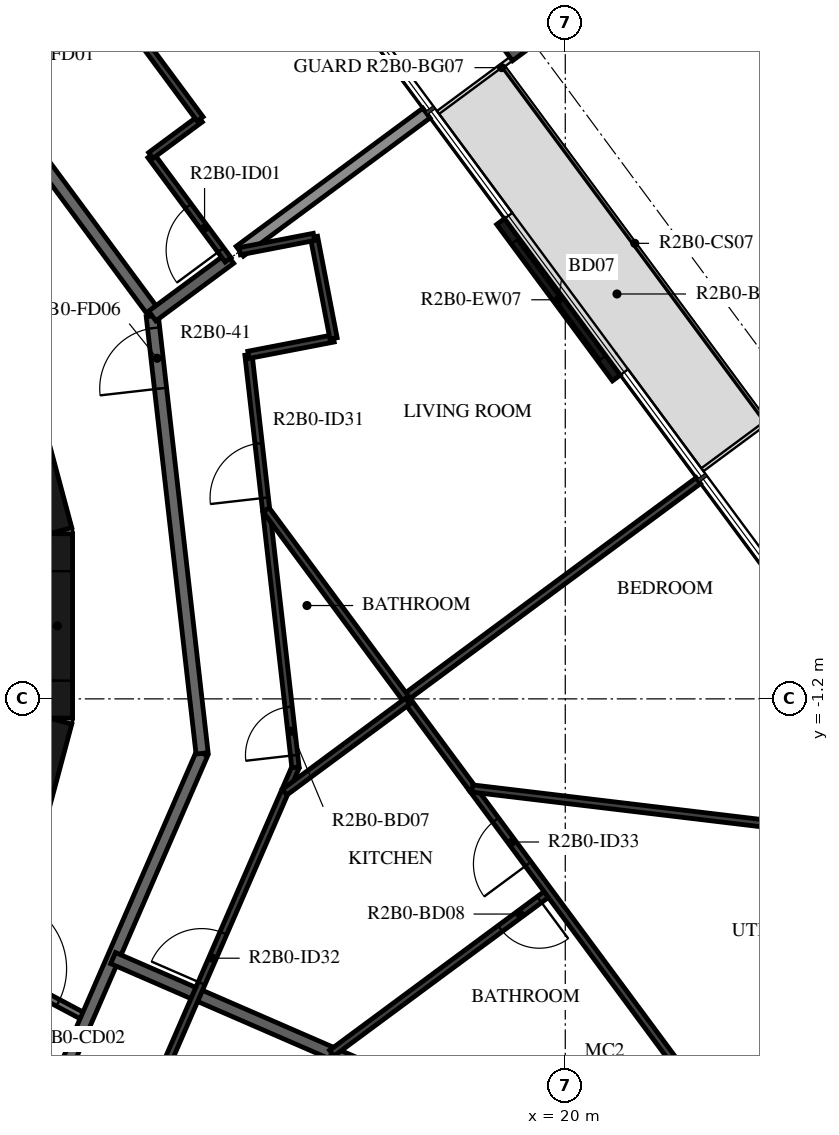
"""IFC4 building model, lengths in metres.
Left out: names, types, materials, properties, quantities, classifications, styles, units other than length and angle.
Written with IfcOpenShell. Run it as: python <this file> out.ifc"""

import sys

from ifc_helpers import new_model, si_unit, direction, frame, frame_2d, origin, origin_2d, place, context, subcontext, project, spatial, rectangle, i_section, extrude, element, fill, save


model = new_model("IFC4")
c1 = context("Model", 3, precision=1e-05, world=origin(), true_north=direction((0.0, 1.0)))
c2 = subcontext(c1, "Body", "Model", "MODEL_VIEW")
j1 = project(units=[si_unit("LENGTHUNIT", "METRE"), si_unit("PLANEANGLEUNIT", "RADIAN")], contexts=[c1])
p1 = place(None, origin())
s1 = spatial("IfcSite", under=j1, at=p1, CompositionType="ELEMENT")
p2 = place(p1, origin())
s2 = spatial("IfcBuilding", under=s1, at=p2, CompositionType="ELEMENT")
p3 = place(p2, frame((0.0, 0.0, 90.7)))
s3 = spatial("IfcBuildingStorey", under=s2, at=p3, CompositionType="ELEMENT", Elevation=90.7)
p4 = place(p3, frame((19.405, 9.682, -0.38), z_axis=(0.0, 0.0, 1.0), x_axis=(0.594822857897, -0.803856807972, 0.0)))
e1 = element("IfcColumn", 1, at=p4, inside=s3, PredefinedType="COLUMN", context=c2, shape_type="SweptSolid", body=[
    extrude(i_section(OverallWidth=0.3, OverallDepth=0.9, WebThickness=0.019, FlangeThickness=0.035, FilletRadius=0.03, at=origin_2d()), origin(), (0.0, 0.0, 1.0), 3.5),
])
p5 = place(p3, frame((20.84, 4.077, 0.0), z_axis=(0.0, 0.0, 1.0), x_axis=(-0.594824273168, 0.803855760725, 0.0)))
e2 = element("IfcWall", 2, at=p5, inside=s3, PredefinedType="STANDARD", context=c2, shape_type="SweptSolid", body=[
    extrude(rectangle(XDim=3.2, YDim=0.16, at=frame_2d((1.6, 0.0))), origin(), (0.0, 0.0, 1.0), 3.12),
])
p6 = place(p5, frame((0.4, 0.0, 0.0)))
e3 = element("IfcOpeningElement", 3, at=p6, cuts=e2, PredefinedType="OPENING", context=c2, shape_type="SweptSolid", body=[
    extrude(rectangle(XDim=2.4, YDim=2.4, at=frame_2d((1.2, 1.2))), frame((0.0, 0.09, 0.0), z_axis=(0.0, -1.0, 0.0), x_axis=(1.0, 0.0, 0.0)), (0.0, 0.0, 1.0), 0.18),
])
p7 = place(p3, frame((10.858, -4.479, 0.0), z_axis=(0.0, 0.0, 1.0), x_axis=(0.258734743916, 0.965948410781, 0.0)))
e4 = element("IfcWall", 4, at=p7, inside=s3, PredefinedType="SHEAR", context=c2, shape_type="SweptSolid", body=[
    extrude(rectangle(XDim=3.033, YDim=0.5, at=frame_2d((1.516, 0.0))), origin(), (0.0, 0.0, 1.0), 3.12),
])
p8 = place(p3, frame((11.647, -1.516, 0.0), z_axis=(0.0, 0.0, 1.0), x_axis=(0.0, 1.0, 0.0)))
e5 = element("IfcWall", 5, at=p8, inside=s3, PredefinedType="SHEAR", context=c2, shape_type="SweptSolid", body=[
    extrude(rectangle(XDim=3.033, YDim=0.5, at=frame_2d((1.516, 0.0))), origin(), (0.0, 0.0, 1.0), 3.12),
])
p9 = place(p8, frame((0.616, 0.0, 0.0)))
e6 = element("IfcOpeningElement", 6, at=p9, cuts=e5, PredefinedType="OPENING", context=c2, shape_type="SweptSolid", body=[
    extrude(rectangle(XDim=1.8, YDim=2.1, at=frame_2d((0.9, 1.05))), frame((0.0, 0.26, 0.0), z_axis=(0.0, -1.0, 0.0), x_axis=(1.0, 0.0, 0.0)), (0.0, 0.0, 1.0), 0.52),
])
p10 = place(p3, frame((11.643, 1.55, 0.0), z_axis=(0.0, 0.0, 1.0), x_axis=(-0.258734743916, 0.965948410781, 0.0)))
e7 = element("IfcWall", 7, at=p10, inside=s3, PredefinedType="SHEAR", context=c2, shape_type="SweptSolid", body=[
    extrude(rectangle(XDim=3.033, YDim=0.5, at=frame_2d((1.516, 0.0))), origin(), (0.0, 0.0, 1.0), 3.12),
])
p11 = place(p3, frame((10.511, -5.589, 0.0), z_axis=(0.0, 0.0, 1.0), x_axis=(0.882962602189, -0.469443333253, 0.0)))
e8 = element("IfcWall", 8, at=p11, inside=s3, PredefinedType="PARTITIONING", context=c2, shape_type="SweptSolid", body=[
    extrude(rectangle(XDim=1.838, YDim=0.12, at=frame_2d((0.919, 0.0))), origin(), (0.0, 0.0, 1.0), 3.12),
])
p12 = place(p11, frame((0.1, 0.0, 0.0)))
e9 = element("IfcOpeningElement", 9, at=p12, cuts=e8, PredefinedType="OPENING", context=c2, shape_type="SweptSolid", body=[
    extrude(rectangle(XDim=1.2, YDim=2.1, at=frame_2d((0.6, 1.05))), frame((0.0, 0.07, 0.0), z_axis=(0.0, -1.0, 0.0), x_axis=(1.0, 0.0, 0.0)), (0.0, 0.0, 1.0), 0.14),
])
p13 = place(p3, frame((13.196, 5.198, 0.0), z_axis=(0.0, 0.0, 1.0), x_axis=(-0.594805187394, 0.803869883159, 0.0)))
e10 = element("IfcWall", 10, at=p13, inside=s3, PredefinedType="STANDARD", context=c2, shape_type="SweptSolid", body=[
    extrude(rectangle(XDim=7.342, YDim=0.2, at=frame_2d((3.671, 0.0))), origin(), (0.0, 0.0, 1.0), 3.12),
])
p14 = place(p13, frame((4.7, 0.0, 0.0)))
e11 = element("IfcOpeningElement", 11, at=p14, cuts=e10, PredefinedType="OPENING", context=c2, shape_type="SweptSolid", body=[
    extrude(rectangle(XDim=1.0, YDim=2.1, at=frame_2d((0.5, 1.05))), frame((0.0, 0.11, 0.0), z_axis=(0.0, -1.0, 0.0), x_axis=(1.0, 0.0, 0.0)), (0.0, 0.0, 1.0), 0.22),
])
p15 = place(p3, frame((11.1, -8.829, 0.0), z_axis=(0.0, 0.0, 1.0), x_axis=(0.398741918631, 0.917063183388, 0.0)))
e12 = element("IfcWall", 12, at=p15, inside=s3, PredefinedType="STANDARD", context=c2, shape_type="SweptSolid", body=[
    extrude(rectangle(XDim=7.342, YDim=0.2, at=frame_2d((3.671, 0.0))), origin(), (0.0, 0.0, 1.0), 3.12),
])
p16 = place(p3, frame((14.028, -2.096, 0.0), z_axis=(0.0, 0.0, 1.0), x_axis=(-0.113207047924, 0.993571418822, 0.0)))
e13 = element("IfcWall", 13, at=p16, inside=s3, PredefinedType="STANDARD", context=c2, shape_type="SweptSolid", body=[
    extrude(rectangle(XDim=7.24, YDim=0.2, at=frame_2d((3.62, 0.0))), origin(), (0.0, 0.0, 1.0), 3.12),
])
p17 = place(p16, frame((6.04, 0.0, 0.0)))
e14 = element("IfcOpeningElement", 14, at=p17, cuts=e13, PredefinedType="OPENING", context=c2, shape_type="SweptSolid", body=[
    extrude(rectangle(XDim=1.0, YDim=2.1, at=frame_2d((0.5, 1.05))), frame((0.0, 0.11, 0.0), z_axis=(0.0, -1.0, 0.0), x_axis=(1.0, 0.0, 0.0)), (0.0, 0.0, 1.0), 0.22),
])
p18 = place(p3, frame((13.208, 5.097, 0.0), z_axis=(0.0, 0.0, 1.0), x_axis=(0.803831627965, 0.594856885211, 0.0)))
e15 = element("IfcWall", 15, at=p18, inside=s3, PredefinedType="STANDARD", context=c2, shape_type="SweptSolid", body=[
    extrude(rectangle(XDim=1.591, YDim=0.2, at=frame_2d((0.796, 0.0))), origin(), (0.0, 0.0, 1.0), 3.12),
])
p19 = place(p3, frame((14.647, 6.161, 0.0), z_axis=(0.0, 0.0, 1.0), x_axis=(0.803842510616, 0.594842179175, 0.0)))
e16 = element("IfcWall", 16, at=p19, inside=s3, PredefinedType="STANDARD", context=c2, shape_type="SweptSolid", body=[
    extrude(rectangle(XDim=3.819, YDim=0.2, at=frame_2d((1.909, 0.0))), origin(), (0.0, 0.0, 1.0), 2.73),
])
p20 = place(p3, frame((16.16, -7.027, 0.0), z_axis=(0.0, 0.0, 1.0), x_axis=(-0.917065107526, 0.398737493293, 0.0)))
e17 = element("IfcWall", 17, at=p20, inside=s3, PredefinedType="STANDARD", context=c2, shape_type="SweptSolid", body=[
    extrude(rectangle(XDim=3.922, YDim=0.2, at=frame_2d((1.961, 0.0))), origin(), (0.0, 0.0, 1.0), 3.12),
])
p21 = place(p3, frame((19.198, -8.347, 0.0), z_axis=(0.0, 0.0, 1.0), x_axis=(-0.917046616943, 0.398780017495, 0.0)))
e18 = element("IfcWall", 18, at=p21, inside=s3, PredefinedType="STANDARD", context=c2, shape_type="SweptSolid", body=[
    extrude(rectangle(XDim=3.312, YDim=0.2, at=frame_2d((1.656, 0.0))), origin(), (0.0, 0.0, 1.0), 3.12),
])
p22 = place(p3, frame((14.455, 6.019, 0.0), z_axis=(0.0, 0.0, 1.0), x_axis=(-0.594792774379, 0.803879067737, 0.0)))
e19 = element("IfcWall", 19, at=p22, inside=s3, PredefinedType="PARTITIONING", context=c2, shape_type="SweptSolid", body=[
    extrude(rectangle(XDim=2.136, YDim=0.12, at=frame_2d((1.068, 0.0))), origin(), (0.0, 0.0, 1.0), 3.12),
])
p23 = place(p22, frame((0.2, 0.0, 0.0)))
e20 = element("IfcOpeningElement", 20, at=p23, cuts=e19, PredefinedType="OPENING", context=c2, shape_type="SweptSolid", body=[
    extrude(rectangle(XDim=0.9, YDim=2.1, at=frame_2d((0.45, 1.05))), frame((0.0, 0.07, 0.0), z_axis=(0.0, -1.0, 0.0), x_axis=(1.0, 0.0, 0.0)), (0.0, 0.0, 1.0), 0.14),
])
p24 = place(p3, frame((13.185, 7.736, 0.0), z_axis=(0.0, 0.0, 1.0), x_axis=(0.803934518159, 0.594717824277, 0.0)))
e21 = element("IfcWall", 21, at=p24, inside=s3, PredefinedType="PARTITIONING", context=c2, shape_type="SweptSolid", body=[
    extrude(rectangle(XDim=1.008, YDim=0.12, at=frame_2d((0.504, 0.0))), origin(), (0.0, 0.0, 1.0), 3.12),
])
p25 = place(p3, frame((13.995, 8.336, 0.0), z_axis=(0.0, 0.0, 1.0), x_axis=(-0.59480284986, 0.803871612758, 0.0)))
e22 = element("IfcWall", 22, at=p25, inside=s3, PredefinedType="PARTITIONING", context=c2, shape_type="SweptSolid", body=[
    extrude(rectangle(XDim=4.4, YDim=0.12, at=frame_2d((2.2, 0.0))), origin(), (0.0, 0.0, 1.0), 3.12),
])
p26 = place(p3, frame((12.703, -8.904, 0.0), z_axis=(0.0, 0.0, 1.0), x_axis=(0.398716154453, 0.917074385303, 0.0)))
e23 = element("IfcWall", 23, at=p26, inside=s3, PredefinedType="PARTITIONING", context=c2, shape_type="SweptSolid", body=[
    extrude(rectangle(XDim=7.173, YDim=0.12, at=frame_2d((3.586, 0.0))), origin(), (0.0, 0.0, 1.0), 3.12),
])
p27 = place(p26, frame((3.3, 0.0, 0.0)))
e24 = element("IfcOpeningElement", 24, at=p27, cuts=e23, PredefinedType="OPENING", context=c2, shape_type="SweptSolid", body=[
    extrude(rectangle(XDim=0.9, YDim=2.1, at=frame_2d((0.45, 1.05))), frame((0.0, 0.07, 0.0), z_axis=(0.0, -1.0, 0.0), x_axis=(1.0, 0.0, 0.0)), (0.0, 0.0, 1.0), 0.14),
])
p28 = place(p3, frame((15.563, -2.326, 0.0), z_axis=(0.0, 0.0, 1.0), x_axis=(-0.113209750844, 0.993571110849, 0.0)))
e25 = element("IfcWall", 25, at=p28, inside=s3, PredefinedType="PARTITIONING", context=c2, shape_type="SweptSolid", body=[
    extrude(rectangle(XDim=6.828, YDim=0.12, at=frame_2d((3.414, 0.0))), origin(), (0.0, 0.0, 1.0), 3.12),
])
p29 = place(p28, frame((4.461, 0.0, 0.0)))
e26 = element("IfcOpeningElement", 26, at=p29, cuts=e25, PredefinedType="OPENING", context=c2, shape_type="SweptSolid", body=[
    extrude(rectangle(XDim=0.9, YDim=2.1, at=frame_2d((0.45, 1.05))), frame((0.0, 0.07, 0.0), z_axis=(0.0, -1.0, 0.0), x_axis=(1.0, 0.0, 0.0)), (0.0, 0.0, 1.0), 0.14),
])
p30 = place(p28, frame((0.2, 0.0, 0.0)))
e27 = element("IfcOpeningElement", 27, at=p30, cuts=e25, PredefinedType="OPENING", context=c2, shape_type="SweptSolid", body=[
    extrude(rectangle(XDim=0.8, YDim=2.1, at=frame_2d((0.4, 1.05))), frame((0.0, 0.07, 0.0), z_axis=(0.0, -1.0, 0.0), x_axis=(1.0, 0.0, 0.0)), (0.0, 0.0, 1.0), 0.14),
])
p31 = place(p3, frame((14.79, 4.458, 0.0), z_axis=(0.0, 0.0, 1.0), x_axis=(0.981914676232, 0.189323977881, 0.0)))
e28 = element("IfcWall", 28, at=p31, inside=s3, PredefinedType="PARTITIONING", context=c2, shape_type="SweptSolid", body=[
    extrude(rectangle(XDim=1.425, YDim=0.12, at=frame_2d((0.712, 0.0))), origin(), (0.0, 0.0, 1.0), 3.12),
])
p32 = place(p3, frame((16.189, 4.728, 0.0), z_axis=(0.0, 0.0, 1.0), x_axis=(-0.18942796612, 0.981894620441, 0.0)))
e29 = element("IfcWall", 29, at=p32, inside=s3, PredefinedType="PARTITIONING", context=c2, shape_type="SweptSolid", body=[
    extrude(rectangle(XDim=1.7, YDim=0.12, at=frame_2d((0.85, 0.0))), origin(), (0.0, 0.0, 1.0), 3.12),
])
p33 = place(p3, frame((15.867, 6.397, 0.0), z_axis=(0.0, 0.0, 1.0), x_axis=(-0.981909648822, -0.189350050303, 0.0)))
e30 = element("IfcWall", 30, at=p33, inside=s3, PredefinedType="PARTITIONING", context=c2, shape_type="SweptSolid", body=[
    extrude(rectangle(XDim=1.243, YDim=0.12, at=frame_2d((0.622, 0.0))), origin(), (0.0, 0.0, 1.0), 3.12),
])
p34 = place(p3, frame((17.366, -1.18, 0.0), z_axis=(0.0, 0.0, 1.0), x_axis=(0.803855518832, 0.594824600065, 0.0)))
e31 = element("IfcWall", 31, at=p34, inside=s3, PredefinedType="PARTITIONING", context=c2, shape_type="SweptSolid", body=[
    extrude(rectangle(XDim=6.0, YDim=0.12, at=frame_2d((3.0, 0.0))), origin(), (0.0, 0.0, 1.0), 2.73),
])
p35 = place(p3, frame((15.081, 1.907, 0.0), z_axis=(0.0, 0.0, 1.0), x_axis=(0.594819754849, -0.803859104098, 0.0)))
e32 = element("IfcWall", 32, at=p35, inside=s3, PredefinedType="PARTITIONING", context=c2, shape_type="SweptSolid", body=[
    extrude(rectangle(XDim=5.699, YDim=0.12, at=frame_2d((2.85, 0.0))), origin(), (0.0, 0.0, 1.0), 3.12),
])
p36 = place(p3, frame((28.162, -6.368, 0.0), z_axis=(0.0, 0.0, 1.0), x_axis=(-0.944645847702, -0.328091789624, 0.0)))
e33 = element("IfcWall", 33, at=p36, inside=s3, PredefinedType="PARTITIONING", context=c2, shape_type="SweptSolid", body=[
    extrude(rectangle(XDim=6.007, YDim=0.12, at=frame_2d((3.003, 0.0))), origin(), (0.0, 0.0, 1.0), 3.12),
])
p37 = place(p36, frame((0.2, 0.0, 0.0)))
e34 = element("IfcOpeningElement", 34, at=p37, cuts=e33, PredefinedType="OPENING", context=c2, shape_type="SweptSolid", body=[
    extrude(rectangle(XDim=0.9, YDim=2.1, at=frame_2d((0.45, 1.05))), frame((0.0, 0.07, 0.0), z_axis=(0.0, -1.0, 0.0), x_axis=(1.0, 0.0, 0.0)), (0.0, 0.0, 1.0), 0.14),
])
p38 = place(p3, frame((19.735, -4.382, 0.0), z_axis=(0.0, 0.0, 1.0), x_axis=(-0.803850825108, -0.594830943188, 0.0)))
e35 = element("IfcWall", 35, at=p38, inside=s3, PredefinedType="PARTITIONING", context=c2, shape_type="SweptSolid", body=[
    extrude(rectangle(XDim=4.447, YDim=0.12, at=frame_2d((2.223, 0.0))), origin(), (0.0, 0.0, 1.0), 3.12),
])
p39 = place(p38, frame((0.2, 0.0, 0.0)))
e36 = element("IfcOpeningElement", 36, at=p39, cuts=e35, PredefinedType="OPENING", context=c2, shape_type="SweptSolid", body=[
    extrude(rectangle(XDim=0.8, YDim=2.1, at=frame_2d((0.4, 1.05))), frame((0.0, 0.07, 0.0), z_axis=(0.0, -1.0, 0.0), x_axis=(1.0, 0.0, 0.0)), (0.0, 0.0, 1.0), 0.14),
])
p40 = place(p3, frame((22.048, -7.507, 0.0), z_axis=(0.0, 0.0, 1.0), x_axis=(-0.59484195588, 0.803842675855, 0.0)))
e37 = element("IfcWall", 37, at=p40, inside=s3, PredefinedType="PARTITIONING", context=c2, shape_type="SweptSolid", body=[
    extrude(rectangle(XDim=6.012, YDim=0.12, at=frame_2d((3.006, 0.0))), origin(), (0.0, 0.0, 1.0), 3.12),
])
p41 = place(p40, frame((4.469, 0.0, 0.0)))
e38 = element("IfcOpeningElement", 38, at=p41, cuts=e37, PredefinedType="OPENING", context=c2, shape_type="SweptSolid", body=[
    extrude(rectangle(XDim=0.9, YDim=2.1, at=frame_2d((0.45, 1.05))), frame((0.0, 0.07, 0.0), z_axis=(0.0, -1.0, 0.0), x_axis=(1.0, 0.0, 0.0)), (0.0, 0.0, 1.0), 0.14),
])
p42 = place(p3, frame((17.408, -1.237, 0.0), z_axis=(0.0, 0.0, 1.0), x_axis=(-0.803863255433, -0.594814144556, 0.0)))
e39 = element("IfcWall", 39, at=p42, inside=s3, PredefinedType="PARTITIONING", context=c2, shape_type="SweptSolid", body=[
    extrude(rectangle(XDim=2.514, YDim=0.12, at=frame_2d((1.257, 0.0))), origin(), (0.0, 0.0, 1.0), 3.12),
])
p43 = place(p3, frame((26.661, -3.655, 0.0), z_axis=(0.0, 0.0, 1.0), x_axis=(-0.992903144553, 0.11892579845, 0.0)))
e40 = element("IfcWall", 40, at=p43, inside=s3, PredefinedType="PARTITIONING", context=c2, shape_type="SweptSolid", body=[
    extrude(rectangle(XDim=8.249, YDim=0.12, at=frame_2d((4.124, 0.0))), origin(), (0.0, 0.0, 1.0), 3.12),
])
p44 = place(p43, frame((0.8, 0.0, 0.0)))
e41 = element("IfcOpeningElement", 41, at=p44, cuts=e40, PredefinedType="OPENING", context=c2, shape_type="SweptSolid", body=[
    extrude(rectangle(XDim=0.9, YDim=2.1, at=frame_2d((0.45, 1.05))), frame((0.0, 0.07, 0.0), z_axis=(0.0, -1.0, 0.0), x_axis=(1.0, 0.0, 0.0)), (0.0, 0.0, 1.0), 0.14),
])
p45 = place(p6, origin())
e42 = element("IfcDoor", 42, at=p45, inside=s3, OperationType="DOUBLE_DOOR_SLIDING", PredefinedType="DOOR", context=c2, shape_type="SweptSolid", body=[
    extrude(rectangle(XDim=2.4, YDim=2.4, at=frame_2d((1.2, 1.2))), frame((0.0, 0.025, 0.0), z_axis=(0.0, -1.0, 0.0), x_axis=(1.0, 0.0, 0.0)), (0.0, 0.0, 1.0), 0.05),
])
fill(e3, e42)
p46 = place(p9, origin())
e43 = element("IfcDoor", 43, at=p46, inside=s3, OperationType="DOUBLE_DOOR_SINGLE_SWING", PredefinedType="DOOR", context=c2, shape_type="SweptSolid", body=[
    extrude(rectangle(XDim=1.8, YDim=2.1, at=frame_2d((0.9, 1.05))), frame((0.0, 0.025, 0.0), z_axis=(0.0, -1.0, 0.0), x_axis=(1.0, 0.0, 0.0)), (0.0, 0.0, 1.0), 0.05),
])
fill(e6, e43)
p47 = place(p23, origin())
e44 = element("IfcDoor", 44, at=p47, inside=s3, OperationType="SINGLE_SWING_LEFT", PredefinedType="DOOR", context=c2, shape_type="SweptSolid", body=[
    extrude(rectangle(XDim=0.9, YDim=2.1, at=frame_2d((0.45, 1.05))), frame((0.0, 0.025, 0.0), z_axis=(0.0, -1.0, 0.0), x_axis=(1.0, 0.0, 0.0)), (0.0, 0.0, 1.0), 0.05),
])
fill(e20, e44)
p48 = place(p17, origin())
e45 = element("IfcDoor", 45, at=p48, inside=s3, OperationType="SINGLE_SWING_LEFT", PredefinedType="DOOR", context=c2, shape_type="SweptSolid", body=[
    extrude(rectangle(XDim=1.0, YDim=2.1, at=frame_2d((0.5, 1.05))), frame((0.0, 0.025, 0.0), z_axis=(0.0, -1.0, 0.0), x_axis=(1.0, 0.0, 0.0)), (0.0, 0.0, 1.0), 0.05),
])
fill(e14, e45)
p49 = place(p29, origin())
e46 = element("IfcDoor", 46, at=p49, inside=s3, OperationType="SINGLE_SWING_LEFT", PredefinedType="DOOR", context=c2, shape_type="SweptSolid", body=[
    extrude(rectangle(XDim=0.9, YDim=2.1, at=frame_2d((0.45, 1.05))), frame((0.0, 0.025, 0.0), z_axis=(0.0, -1.0, 0.0), x_axis=(1.0, 0.0, 0.0)), (0.0, 0.0, 1.0), 0.05),
])
fill(e26, e46)
p50 = place(p27, origin())
e47 = element("IfcDoor", 47, at=p50, inside=s3, OperationType="SINGLE_SWING_RIGHT", PredefinedType="DOOR", context=c2, shape_type="SweptSolid", body=[
    extrude(rectangle(XDim=0.9, YDim=2.1, at=frame_2d((0.45, 1.05))), frame((0.0, 0.025, 0.0), z_axis=(0.0, -1.0, 0.0), x_axis=(1.0, 0.0, 0.0)), (0.0, 0.0, 1.0), 0.05),
])
fill(e24, e47)
p51 = place(p30, origin())
e48 = element("IfcDoor", 48, at=p51, inside=s3, OperationType="SINGLE_SWING_LEFT", PredefinedType="DOOR", context=c2, shape_type="SweptSolid", body=[
    extrude(rectangle(XDim=0.8, YDim=2.1, at=frame_2d((0.4, 1.05))), frame((0.0, 0.025, 0.0), z_axis=(0.0, -1.0, 0.0), x_axis=(1.0, 0.0, 0.0)), (0.0, 0.0, 1.0), 0.05),
])
fill(e27, e48)
p52 = place(p39, origin())
e49 = element("IfcDoor", 49, at=p52, inside=s3, OperationType="SINGLE_SWING_LEFT", PredefinedType="DOOR", context=c2, shape_type="SweptSolid", body=[
    extrude(rectangle(XDim=0.8, YDim=2.1, at=frame_2d((0.4, 1.05))), frame((0.0, 0.025, 0.0), z_axis=(0.0, -1.0, 0.0), x_axis=(1.0, 0.0, 0.0)), (0.0, 0.0, 1.0), 0.05),
])
fill(e36, e49)
p53 = place(p41, origin())
e50 = element("IfcDoor", 50, at=p53, inside=s3, OperationType="SINGLE_SWING_LEFT", PredefinedType="DOOR", context=c2, shape_type="SweptSolid", body=[
    extrude(rectangle(XDim=0.9, YDim=2.1, at=frame_2d((0.45, 1.05))), frame((0.0, 0.025, 0.0), z_axis=(0.0, -1.0, 0.0), x_axis=(1.0, 0.0, 0.0)), (0.0, 0.0, 1.0), 0.05),
])
fill(e38, e50)
p54 = place(p12, origin())
e51 = element("IfcDoor", 51, at=p54, inside=s3, OperationType="DOUBLE_DOOR_SINGLE_SWING", PredefinedType="DOOR", context=c2, shape_type="SweptSolid", body=[
    extrude(rectangle(XDim=1.2, YDim=2.1, at=frame_2d((0.6, 1.05))), frame((0.0, 0.025, 0.0), z_axis=(0.0, -1.0, 0.0), x_axis=(1.0, 0.0, 0.0)), (0.0, 0.0, 1.0), 0.05),
])
fill(e9, e51)
save(model, sys.argv[1])
